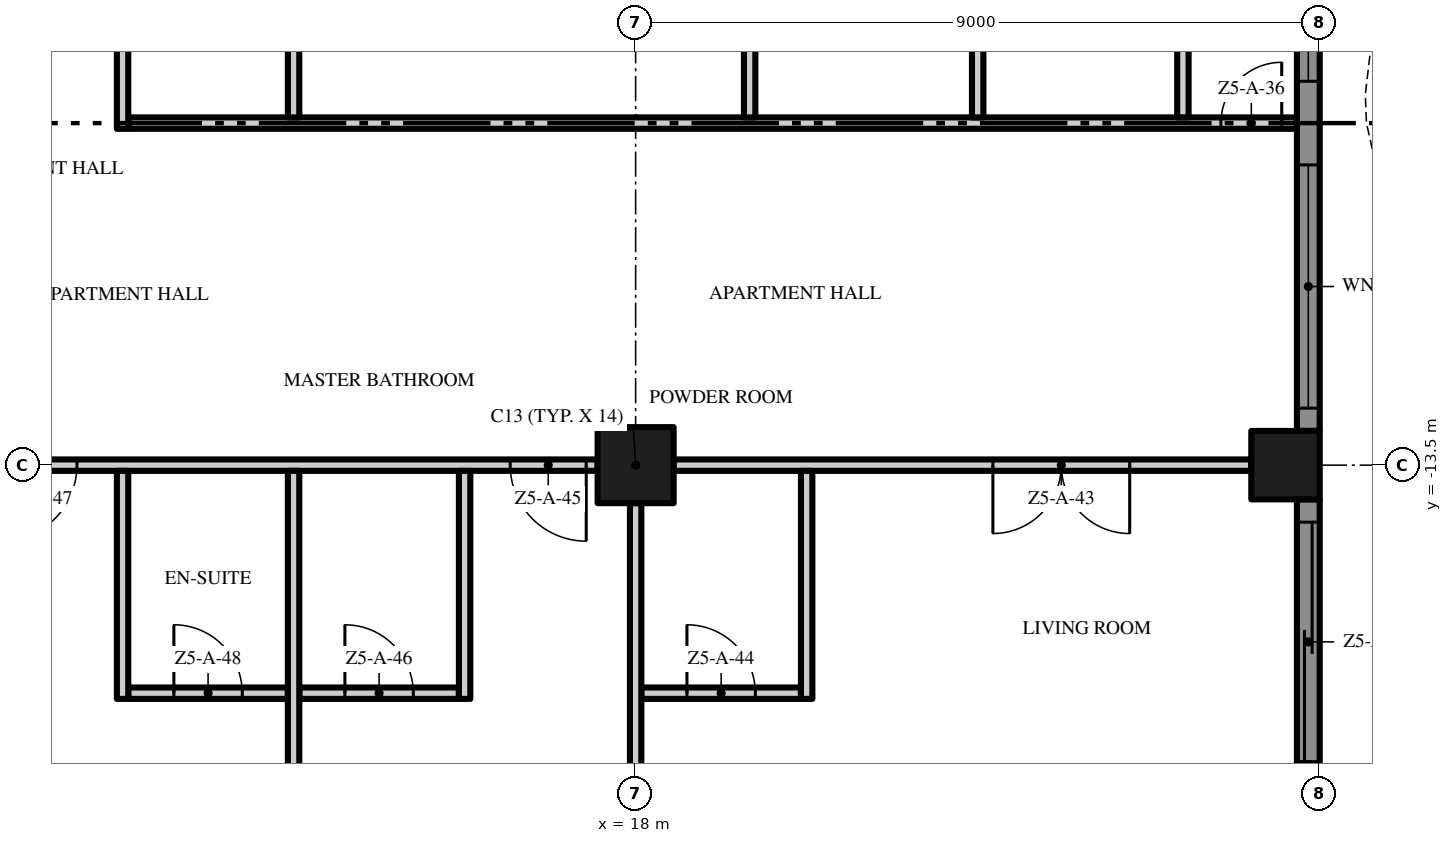
"""IFC4 building model, lengths in metres.
Left out: names, types, materials, properties, quantities, classifications, styles, units other than length and angle.
Written with IfcOpenShell. Run it as: python <this file> out.ifc"""

import sys

from ifc_helpers import new_model, si_unit, direction, frame, frame_2d, origin, origin_2d, place, context, subcontext, project, spatial, polyline, rectangle, outline, extrude, element, fill, save


model = new_model("IFC4")
c1 = context("Model", 3, precision=1e-05, world=origin(), true_north=direction((0.0, 1.0)))
c2 = subcontext(c1, "Body", "Model", "MODEL_VIEW")
j1 = project(units=[si_unit("LENGTHUNIT", "METRE"), si_unit("PLANEANGLEUNIT", "RADIAN")], contexts=[c1])
p1 = place(None, origin())
s1 = spatial("IfcSite", under=j1, at=p1, CompositionType="ELEMENT")
p2 = place(p1, origin())
s2 = spatial("IfcBuilding", under=s1, at=p2, CompositionType="ELEMENT")
p3 = place(p2, frame((0.0, 0.0, 246.4)))
s3 = spatial("IfcBuildingStorey", under=s2, at=p3, CompositionType="ELEMENT", Elevation=246.4)
p4 = place(p3, frame((18.0, -13.5, 0.0), z_axis=(0.0, 0.0, 1.0), x_axis=(1.0, 0.0, 0.0)))
e1 = element("IfcColumn", 1, at=p4, inside=s3, PredefinedType="COLUMN", context=c2, shape_type="SweptSolid", body=[
    extrude(rectangle(XDim=1.0, YDim=1.0, at=origin_2d()), origin(), (0.0, 0.0, 1.0), 3.5),
])
p5 = place(p3, frame((26.55, -13.5, 0.0), z_axis=(0.0, 0.0, 1.0), x_axis=(1.0, 0.0, 0.0)))
e2 = element("IfcColumn", 2, at=p5, inside=s3, PredefinedType="COLUMN", context=c2, shape_type="SweptSolid", body=[
    extrude(rectangle(XDim=0.9, YDim=0.9, at=origin_2d()), origin(), (0.0, 0.0, 1.0), 3.5),
])
p6 = place(p3, frame((26.85, -13.95, 0.0), z_axis=(0.0, 0.0, 1.0), x_axis=(0.0, -1.0, 0.0)))
e3 = element("IfcWall", 3, at=p6, inside=s3, PredefinedType="SOLIDWALL", context=c2, shape_type="SweptSolid", body=[
    extrude(rectangle(XDim=3.75, YDim=0.3, at=frame_2d((1.875, 0.0))), origin(), (0.0, 0.0, 1.0), 3.5),
])
p7 = place(p6, frame((0.3, 0.0, 0.0)))
e4 = element("IfcOpeningElement", 4, at=p7, cuts=e3, PredefinedType="OPENING", context=c2, shape_type="SweptSolid", body=[
    extrude(rectangle(XDim=3.15, YDim=2.4, at=frame_2d((1.575, 1.2))), frame((0.0, 0.16, 0.0), z_axis=(0.0, -1.0, 0.0), x_axis=(1.0, 0.0, 0.0)), (0.0, 0.0, 1.0), 0.32),
])
p8 = place(p3, frame((26.85, -4.95, 0.0), z_axis=(0.0, 0.0, 1.0), x_axis=(0.0, -1.0, 0.0)))
e5 = element("IfcWall", 5, at=p8, inside=s3, PredefinedType="SOLIDWALL", context=c2, shape_type="SweptSolid", body=[
    extrude(rectangle(XDim=8.1, YDim=0.3, at=frame_2d((4.05, 0.0))), origin(), (0.0, 0.0, 1.0), 3.5),
])
p9 = place(p8, frame((4.6, 0.0, 0.45)))
e6 = element("IfcOpeningElement", 6, at=p9, cuts=e5, PredefinedType="OPENING", context=c2, shape_type="SweptSolid", body=[
    extrude(rectangle(XDim=3.2, YDim=2.65, at=frame_2d((1.6, 1.325))), frame((0.0, 0.16, 0.0), z_axis=(0.0, -1.0, 0.0), x_axis=(1.0, 0.0, 0.0)), (0.0, 0.0, 1.0), 0.32),
])
p10 = place(p8, frame((0.3, 0.0, 0.45)))
e7 = element("IfcOpeningElement", 7, at=p10, cuts=e5, PredefinedType="OPENING", context=c2, shape_type="SweptSolid", body=[
    extrude(rectangle(XDim=3.2, YDim=2.65, at=frame_2d((1.6, 1.325))), frame((0.0, 0.16, 0.0), z_axis=(0.0, -1.0, 0.0), x_axis=(1.0, 0.0, 0.0)), (0.0, 0.0, 1.0), 0.32),
])
p11 = place(p3, origin())
e8 = element("IfcWall", 8, at=p11, inside=s3, PredefinedType="USERDEFINED", context=c2, shape_type="SweptSolid", body=[
    extrude(outline(polyline([(29.649, -18.0), (29.985, -16.5), (30.0, -16.125), (29.869, -15.0), (29.345, -13.5), (28.612, -12.0), (27.951, -10.5), (27.615, -9.0), (27.6, -8.625), (27.731, -7.5), (28.255, -6.0), (28.988, -4.5), (29.649, -3.0), (29.985, -1.5), (30.0, -1.125), (29.869, 0.0), (29.345, 1.5), (28.612, 3.0), (27.951, 4.5), (27.615, 6.0), (27.6, 6.375), (27.731, 7.5), (28.255, 9.0), (28.988, 10.5), (29.649, 12.0), (29.985, 13.5), (30.0, 13.875), (29.869, 15.0), (29.345, 16.5), (28.612, 18.0), (28.388, 17.89), (29.114, 16.404), (29.624, 14.944), (29.749, 13.865), (29.736, 13.533), (29.41, 12.079), (28.761, 10.605), (28.024, 9.096), (27.486, 7.556), (27.349, 6.385), (27.366, 5.967), (27.713, 4.421), (28.385, 2.895), (29.114, 1.404), (29.624, -0.056), (29.749, -1.135), (29.736, -1.467), (29.41, -2.921), (28.761, -4.395), (28.024, -5.904), (27.486, -7.444), (27.349, -8.615), (27.366, -9.033), (27.713, -10.579), (28.385, -12.105), (29.114, -13.596), (29.624, -15.056), (29.749, -16.135), (29.736, -16.467), (29.405, -17.945), (29.649, -18.0)])), origin(), (0.0, 0.0, 1.0), 0.9),
])
p12 = place(p3, frame((11.325, -16.5, 0.0), z_axis=(0.0, 0.0, 1.0), x_axis=(1.0, 0.0, 0.0)))
e9 = element("IfcWall", 9, at=p12, inside=s3, PredefinedType="PARTITIONING", context=c2, shape_type="SweptSolid", body=[
    extrude(rectangle(XDim=2.1, YDim=0.15, at=frame_2d((1.05, 0.0))), origin(), (0.0, 0.0, 1.0), 3.5),
])
p13 = place(p12, frame((0.6, 0.0, 0.0)))
e10 = element("IfcOpeningElement", 10, at=p13, cuts=e9, PredefinedType="OPENING", context=c2, shape_type="SweptSolid", body=[
    extrude(rectangle(XDim=0.9, YDim=2.1, at=frame_2d((0.45, 1.05))), frame((0.0, 0.085, 0.0), z_axis=(0.0, -1.0, 0.0), x_axis=(1.0, 0.0, 0.0)), (0.0, 0.0, 1.0), 0.17),
])
p14 = place(p3, frame((13.575, -16.5, 0.0), z_axis=(0.0, 0.0, 1.0), x_axis=(1.0, 0.0, 0.0)))
e11 = element("IfcWall", 11, at=p14, inside=s3, PredefinedType="PARTITIONING", context=c2, shape_type="SweptSolid", body=[
    extrude(rectangle(XDim=2.1, YDim=0.15, at=frame_2d((1.05, 0.0))), origin(), (0.0, 0.0, 1.0), 3.5),
])
p15 = place(p14, frame((0.6, 0.0, 0.0)))
e12 = element("IfcOpeningElement", 12, at=p15, cuts=e11, PredefinedType="OPENING", context=c2, shape_type="SweptSolid", body=[
    extrude(rectangle(XDim=0.9, YDim=2.1, at=frame_2d((0.45, 1.05))), frame((0.0, 0.085, 0.0), z_axis=(0.0, -1.0, 0.0), x_axis=(1.0, 0.0, 0.0)), (0.0, 0.0, 1.0), 0.17),
])
p16 = place(p3, frame((18.075, -16.5, 0.0), z_axis=(0.0, 0.0, 1.0), x_axis=(1.0, 0.0, 0.0)))
e13 = element("IfcWall", 13, at=p16, inside=s3, PredefinedType="PARTITIONING", context=c2, shape_type="SweptSolid", body=[
    extrude(rectangle(XDim=2.1, YDim=0.15, at=frame_2d((1.05, 0.0))), origin(), (0.0, 0.0, 1.0), 3.5),
])
p17 = place(p16, frame((0.6, 0.0, 0.0)))
e14 = element("IfcOpeningElement", 14, at=p17, cuts=e13, PredefinedType="OPENING", context=c2, shape_type="SweptSolid", body=[
    extrude(rectangle(XDim=0.9, YDim=2.1, at=frame_2d((0.45, 1.05))), frame((0.0, 0.085, 0.0), z_axis=(0.0, -1.0, 0.0), x_axis=(1.0, 0.0, 0.0)), (0.0, 0.0, 1.0), 0.17),
])
p18 = place(p3, frame((17.5, -13.5, 0.0), z_axis=(0.0, 0.0, 1.0), x_axis=(-1.0, 0.0, 0.0)))
e15 = element("IfcWall", 15, at=p18, inside=s3, PredefinedType="PARTITIONING", context=c2, shape_type="SweptSolid", body=[
    extrude(rectangle(XDim=8.0, YDim=0.15, at=frame_2d((4.0, 0.0))), origin(), (0.0, 0.0, 1.0), 3.5),
])
p19 = place(p18, frame((0.15, 0.0, 0.0)))
e16 = element("IfcOpeningElement", 16, at=p19, cuts=e15, PredefinedType="OPENING", context=c2, shape_type="SweptSolid", body=[
    extrude(rectangle(XDim=1.0, YDim=2.4, at=frame_2d((0.5, 1.2))), frame((0.0, 0.085, 0.0), z_axis=(0.0, -1.0, 0.0), x_axis=(1.0, 0.0, 0.0)), (0.0, 0.0, 1.0), 0.17),
])
p20 = place(p18, frame((6.85, 0.0, 0.0)))
e17 = element("IfcOpeningElement", 17, at=p20, cuts=e15, PredefinedType="OPENING", context=c2, shape_type="SweptSolid", body=[
    extrude(rectangle(XDim=1.0, YDim=2.4, at=frame_2d((0.5, 1.2))), frame((0.0, 0.085, 0.0), z_axis=(0.0, -1.0, 0.0), x_axis=(1.0, 0.0, 0.0)), (0.0, 0.0, 1.0), 0.17),
])
p21 = place(p3, frame((26.1, -13.5, 0.0), z_axis=(0.0, 0.0, 1.0), x_axis=(-1.0, 0.0, 0.0)))
e18 = element("IfcWall", 18, at=p21, inside=s3, PredefinedType="PARTITIONING", context=c2, shape_type="SweptSolid", body=[
    extrude(rectangle(XDim=7.6, YDim=0.15, at=frame_2d((3.8, 0.0))), origin(), (0.0, 0.0, 1.0), 3.5),
])
p22 = place(p21, frame((1.6, 0.0, 0.0)))
e19 = element("IfcOpeningElement", 19, at=p22, cuts=e18, PredefinedType="OPENING", context=c2, shape_type="SweptSolid", body=[
    extrude(rectangle(XDim=1.8, YDim=2.4, at=frame_2d((0.9, 1.2))), frame((0.0, 0.085, 0.0), z_axis=(0.0, -1.0, 0.0), x_axis=(1.0, 0.0, 0.0)), (0.0, 0.0, 1.0), 0.17),
])
p23 = place(p3, frame((11.325, -9.0, 0.0), z_axis=(0.0, 0.0, 1.0), x_axis=(1.0, 0.0, 0.0)))
e20 = element("IfcWall", 20, at=p23, inside=s3, PredefinedType="PARTITIONING", context=c2, shape_type="SweptSolid", body=[
    extrude(rectangle(XDim=15.375, YDim=0.15, at=frame_2d((7.688, 0.0))), origin(), (0.0, 0.0, 1.0), 3.5),
])
p24 = place(p23, frame((14.375, 0.0, 0.0)))
e21 = element("IfcOpeningElement", 21, at=p24, cuts=e20, PredefinedType="OPENING", context=c2, shape_type="SweptSolid", body=[
    extrude(rectangle(XDim=0.8, YDim=2.0, at=frame_2d((0.4, 1.0))), frame((0.0, 0.085, 0.0), z_axis=(0.0, -1.0, 0.0), x_axis=(1.0, 0.0, 0.0)), (0.0, 0.0, 1.0), 0.17),
])
p25 = place(p3, frame((11.25, -16.575, 0.0), z_axis=(0.0, 0.0, 1.0), x_axis=(0.0, 1.0, 0.0)))
e22 = element("IfcWall", 22, at=p25, inside=s3, PredefinedType="PARTITIONING", context=c2, shape_type="SweptSolid", body=[
    extrude(rectangle(XDim=3.0, YDim=0.15, at=frame_2d((1.5, 0.0))), origin(), (0.0, 0.0, 1.0), 3.5),
])
p26 = place(p3, frame((11.25, -4.425, 0.0), z_axis=(0.0, 0.0, 1.0), x_axis=(0.0, -1.0, 0.0)))
e23 = element("IfcWall", 23, at=p26, inside=s3, PredefinedType="PARTITIONING", context=c2, shape_type="SweptSolid", body=[
    extrude(rectangle(XDim=4.65, YDim=0.15, at=frame_2d((2.325, 0.0))), origin(), (0.0, 0.0, 1.0), 3.5),
])
p27 = place(p26, frame((1.875, 0.0, 0.0)))
e24 = element("IfcOpeningElement", 24, at=p27, cuts=e23, PredefinedType="OPENING", context=c2, shape_type="SweptSolid", body=[
    extrude(rectangle(XDim=0.9, YDim=2.1, at=frame_2d((0.45, 1.05))), frame((0.0, 0.085, 0.0), z_axis=(0.0, -1.0, 0.0), x_axis=(1.0, 0.0, 0.0)), (0.0, 0.0, 1.0), 0.17),
])
p28 = place(p3, frame((13.5, -22.2, 0.0), z_axis=(0.0, 0.0, 1.0), x_axis=(0.0, 1.0, 0.0)))
e25 = element("IfcWall", 25, at=p28, inside=s3, PredefinedType="PARTITIONING", context=c2, shape_type="SweptSolid", body=[
    extrude(rectangle(XDim=8.625, YDim=0.15, at=frame_2d((4.312, 0.0))), origin(), (0.0, 0.0, 1.0), 3.5),
])
p29 = place(p3, frame((13.5, -8.925, 0.0), z_axis=(0.0, 0.0, 1.0), x_axis=(0.0, 1.0, 0.0)))
e26 = element("IfcWall", 26, at=p29, inside=s3, PredefinedType="PARTITIONING", context=c2, shape_type="SweptSolid", body=[
    extrude(rectangle(XDim=4.35, YDim=0.15, at=frame_2d((2.175, 0.0))), origin(), (0.0, 0.0, 1.0), 3.5),
])
p30 = place(p3, frame((15.75, -16.575, 0.0), z_axis=(0.0, 0.0, 1.0), x_axis=(0.0, 1.0, 0.0)))
e27 = element("IfcWall", 27, at=p30, inside=s3, PredefinedType="PARTITIONING", context=c2, shape_type="SweptSolid", body=[
    extrude(rectangle(XDim=3.0, YDim=0.15, at=frame_2d((1.5, 0.0))), origin(), (0.0, 0.0, 1.0), 3.5),
])
p31 = place(p3, frame((18.0, -21.6, 0.0), z_axis=(0.0, 0.0, 1.0), x_axis=(0.0, 1.0, 0.0)))
e28 = element("IfcWall", 28, at=p31, inside=s3, PredefinedType="PARTITIONING", context=c2, shape_type="SweptSolid", body=[
    extrude(rectangle(XDim=7.6, YDim=0.15, at=frame_2d((3.8, 0.0))), origin(), (0.0, 0.0, 1.0), 3.5),
])
p32 = place(p3, frame((19.5, -8.925, 0.0), z_axis=(0.0, 0.0, 1.0), x_axis=(0.0, 1.0, 0.0)))
e29 = element("IfcWall", 29, at=p32, inside=s3, PredefinedType="PARTITIONING", context=c2, shape_type="SweptSolid", body=[
    extrude(rectangle(XDim=4.35, YDim=0.15, at=frame_2d((2.175, 0.0))), origin(), (0.0, 0.0, 1.0), 3.5),
])
p33 = place(p3, frame((20.25, -16.575, 0.0), z_axis=(0.0, 0.0, 1.0), x_axis=(0.0, 1.0, 0.0)))
e30 = element("IfcWall", 30, at=p33, inside=s3, PredefinedType="PARTITIONING", context=c2, shape_type="SweptSolid", body=[
    extrude(rectangle(XDim=3.0, YDim=0.15, at=frame_2d((1.5, 0.0))), origin(), (0.0, 0.0, 1.0), 3.5),
])
for number, where, z_axis, x_axis in (
    (31, (22.5, -8.925, 0.0), (0.0, 0.0, 1.0), (0.0, 1.0, 0.0)),
    (32, (25.2, -8.925, 0.0), (0.0, 0.0, 1.0), (0.0, 1.0, 0.0)),
):
    element("IfcWall", number, at=place(p3, frame(where, z_axis=z_axis, x_axis=x_axis)), inside=s3, PredefinedType="PARTITIONING", context=c2, shape_type="SweptSolid", body=[
        extrude(rectangle(XDim=4.35, YDim=0.15, at=frame_2d((2.175, 0.0))), origin(), (0.0, 0.0, 1.0), 3.5),
    ])
p34 = place(p7, origin())
e33 = element("IfcDoor", 33, at=p34, inside=s3, OperationType="SINGLE_SWING_LEFT", PredefinedType="DOOR", context=c2, shape_type="SweptSolid", body=[
    extrude(rectangle(XDim=3.15, YDim=2.4, at=frame_2d((1.575, 1.2))), frame((0.0, 0.025, 0.0), z_axis=(0.0, -1.0, 0.0), x_axis=(1.0, 0.0, 0.0)), (0.0, 0.0, 1.0), 0.05),
])
fill(e4, e33)
p35 = place(p9, origin())
e34 = element("IfcWindow", 34, at=p35, inside=s3, PartitioningType="SINGLE_PANEL", PredefinedType="WINDOW", context=c2, shape_type="SweptSolid", body=[
    extrude(rectangle(XDim=3.2, YDim=2.65, at=frame_2d((1.6, 1.325))), frame((0.0, 0.03, 0.0), z_axis=(0.0, -1.0, 0.0), x_axis=(1.0, 0.0, 0.0)), (0.0, 0.0, 1.0), 0.06),
])
fill(e6, e34)
p36 = place(p10, origin())
e35 = element("IfcWindow", 35, at=p36, inside=s3, PartitioningType="SINGLE_PANEL", PredefinedType="WINDOW", context=c2, shape_type="SweptSolid", body=[
    extrude(rectangle(XDim=3.2, YDim=2.65, at=frame_2d((1.6, 1.325))), frame((0.0, 0.03, 0.0), z_axis=(0.0, -1.0, 0.0), x_axis=(1.0, 0.0, 0.0)), (0.0, 0.0, 1.0), 0.06),
])
fill(e7, e35)
p37 = place(p24, origin())
e36 = element("IfcDoor", 36, at=p37, inside=s3, OperationType="SINGLE_SWING_RIGHT", PredefinedType="DOOR", context=c2, shape_type="SweptSolid", body=[
    extrude(rectangle(XDim=0.8, YDim=2.0, at=frame_2d((0.4, 1.0))), frame((0.0, 0.025, 0.0), z_axis=(0.0, -1.0, 0.0), x_axis=(1.0, 0.0, 0.0)), (0.0, 0.0, 1.0), 0.05),
])
fill(e21, e36)
p38 = place(p22, origin())
e37 = element("IfcDoor", 37, at=p38, inside=s3, OperationType="DOUBLE_DOOR_SINGLE_SWING", PredefinedType="DOOR", context=c2, shape_type="SweptSolid", body=[
    extrude(rectangle(XDim=1.8, YDim=2.4, at=frame_2d((0.9, 1.2))), frame((0.0, 0.025, 0.0), z_axis=(0.0, -1.0, 0.0), x_axis=(1.0, 0.0, 0.0)), (0.0, 0.0, 1.0), 0.05),
])
fill(e19, e37)
p39 = place(p17, origin())
e38 = element("IfcDoor", 38, at=p39, inside=s3, OperationType="SINGLE_SWING_LEFT", PredefinedType="DOOR", context=c2, shape_type="SweptSolid", body=[
    extrude(rectangle(XDim=0.9, YDim=2.1, at=frame_2d((0.45, 1.05))), frame((0.0, 0.025, 0.0), z_axis=(0.0, -1.0, 0.0), x_axis=(1.0, 0.0, 0.0)), (0.0, 0.0, 1.0), 0.05),
])
fill(e14, e38)
p40 = place(p19, origin())
e39 = element("IfcDoor", 39, at=p40, inside=s3, OperationType="SINGLE_SWING_LEFT", PredefinedType="DOOR", context=c2, shape_type="SweptSolid", body=[
    extrude(rectangle(XDim=1.0, YDim=2.4, at=frame_2d((0.5, 1.2))), frame((0.0, 0.025, 0.0), z_axis=(0.0, -1.0, 0.0), x_axis=(1.0, 0.0, 0.0)), (0.0, 0.0, 1.0), 0.05),
])
fill(e16, e39)
p41 = place(p15, origin())
e40 = element("IfcDoor", 40, at=p41, inside=s3, OperationType="SINGLE_SWING_LEFT", PredefinedType="DOOR", context=c2, shape_type="SweptSolid", body=[
    extrude(rectangle(XDim=0.9, YDim=2.1, at=frame_2d((0.45, 1.05))), frame((0.0, 0.025, 0.0), z_axis=(0.0, -1.0, 0.0), x_axis=(1.0, 0.0, 0.0)), (0.0, 0.0, 1.0), 0.05),
])
fill(e12, e40)
p42 = place(p20, origin())
e41 = element("IfcDoor", 41, at=p42, inside=s3, OperationType="SINGLE_SWING_RIGHT", PredefinedType="DOOR", context=c2, shape_type="SweptSolid", body=[
    extrude(rectangle(XDim=1.0, YDim=2.4, at=frame_2d((0.5, 1.2))), frame((0.0, 0.025, 0.0), z_axis=(0.0, -1.0, 0.0), x_axis=(1.0, 0.0, 0.0)), (0.0, 0.0, 1.0), 0.05),
])
fill(e17, e41)
p43 = place(p13, origin())
e42 = element("IfcDoor", 42, at=p43, inside=s3, OperationType="SINGLE_SWING_LEFT", PredefinedType="DOOR", context=c2, shape_type="SweptSolid", body=[
    extrude(rectangle(XDim=0.9, YDim=2.1, at=frame_2d((0.45, 1.05))), frame((0.0, 0.025, 0.0), z_axis=(0.0, -1.0, 0.0), x_axis=(1.0, 0.0, 0.0)), (0.0, 0.0, 1.0), 0.05),
])
fill(e10, e42)
save(model, sys.argv[1])
